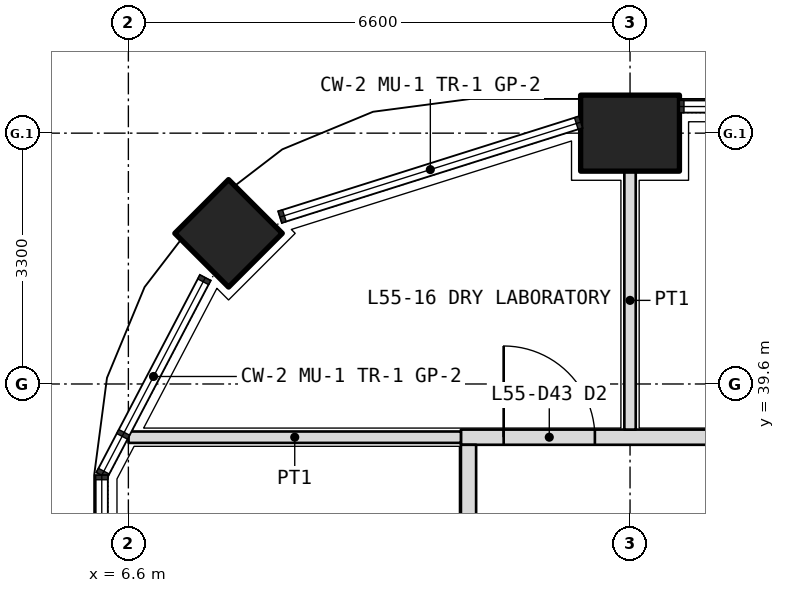
"""IFC4 building model, lengths in metres.
Left out: names, types, materials, properties, quantities, classifications, styles, units other than length and angle.
Written with IfcOpenShell. Run it as: python <this file> out.ifc"""

import sys

from ifc_helpers import new_model, si_unit, direction, frame, frame_2d, origin, origin_2d, place, context, subcontext, project, spatial, rectangle, extrude, element, fill, save


model = new_model("IFC4")
c1 = context("Model", 3, precision=1e-05, world=origin(), true_north=direction((0.0, 1.0)))
c2 = subcontext(c1, "Body", "Model", "MODEL_VIEW")
j1 = project(units=[si_unit("LENGTHUNIT", "METRE"), si_unit("PLANEANGLEUNIT", "RADIAN")], contexts=[c1])
p1 = place(None, origin())
s1 = spatial("IfcSite", under=j1, at=p1, CompositionType="ELEMENT")
p2 = place(p1, origin())
s2 = spatial("IfcBuilding", under=s1, at=p2, CompositionType="ELEMENT")
p3 = place(p2, frame((0.0, 0.0, 241.8)))
s3 = spatial("IfcBuildingStorey", under=s2, at=p3, CompositionType="ELEMENT", Elevation=241.8)
p4 = place(p3, frame((7.918, 41.582, 0.0), z_axis=(0.0, 0.0, 1.0), x_axis=(0.707106781187, 0.707106781187, 0.0)))
e1 = element("IfcColumn", 1, at=p4, inside=s3, PredefinedType="COLUMN", context=c2, shape_type="SweptSolid", body=[
    extrude(rectangle(XDim=1.0, YDim=1.0, at=origin_2d()), origin(), (0.0, 0.0, 1.0), 4.2),
])
p5 = place(p3, frame((13.2, 42.9, 0.0), z_axis=(0.0, 0.0, 1.0), x_axis=(1.0, 0.0, 0.0)))
e2 = element("IfcColumn", 2, at=p5, inside=s3, PredefinedType="COLUMN", context=c2, shape_type="SweptSolid", body=[
    extrude(rectangle(XDim=1.3, YDim=1.0, at=origin_2d()), origin(), (0.0, 0.0, 1.0), 4.2),
])
p6 = place(p3, frame((10.975, 38.9, 0.0), z_axis=(0.0, 0.0, 1.0), x_axis=(1.0, 0.0, 0.0)))
e3 = element("IfcWall", 3, at=p6, inside=s3, PredefinedType="PARTITIONING", context=c2, shape_type="SweptSolid", body=[
    extrude(rectangle(XDim=22.025, YDim=0.2, at=frame_2d((11.012, 0.0))), origin(), (0.0, 0.0, 1.0), 3.0),
])
p7 = place(p6, frame((0.562, 0.0, 0.0)))
e4 = element("IfcOpeningElement", 4, at=p7, cuts=e3, PredefinedType="OPENING", context=c2, shape_type="SweptSolid", body=[
    extrude(rectangle(XDim=1.2, YDim=2.1, at=frame_2d((0.6, 1.05))), frame((0.0, 0.11, 0.0), z_axis=(0.0, -1.0, 0.0), x_axis=(1.0, 0.0, 0.0)), (0.0, 0.0, 1.0), 0.22),
])
p8 = place(p6, frame((6.675, 0.0, 0.0)))
e5 = element("IfcOpeningElement", 5, at=p8, cuts=e3, PredefinedType="OPENING", context=c2, shape_type="SweptSolid", body=[
    extrude(rectangle(XDim=1.0, YDim=2.1, at=frame_2d((0.5, 1.05))), frame((0.0, 0.11, 0.0), z_axis=(0.0, -1.0, 0.0), x_axis=(1.0, 0.0, 0.0)), (0.0, 0.0, 1.0), 0.22),
])
p9 = place(p6, frame((13.375, 0.0, 0.0)))
e6 = element("IfcOpeningElement", 6, at=p9, cuts=e3, PredefinedType="OPENING", context=c2, shape_type="SweptSolid", body=[
    extrude(rectangle(XDim=1.0, YDim=2.1, at=frame_2d((0.5, 1.05))), frame((0.0, 0.11, 0.0), z_axis=(0.0, -1.0, 0.0), x_axis=(1.0, 0.0, 0.0)), (0.0, 0.0, 1.0), 0.22),
])
p10 = place(p6, frame((16.675, 0.0, 0.0)))
e7 = element("IfcOpeningElement", 7, at=p10, cuts=e3, PredefinedType="OPENING", context=c2, shape_type="SweptSolid", body=[
    extrude(rectangle(XDim=1.0, YDim=2.1, at=frame_2d((0.5, 1.05))), frame((0.0, 0.11, 0.0), z_axis=(0.0, -1.0, 0.0), x_axis=(1.0, 0.0, 0.0)), (0.0, 0.0, 1.0), 0.22),
])
p11 = place(p6, frame((19.875, 0.0, 0.0)))
e8 = element("IfcOpeningElement", 8, at=p11, cuts=e3, PredefinedType="OPENING", context=c2, shape_type="SweptSolid", body=[
    extrude(rectangle(XDim=1.0, YDim=2.1, at=frame_2d((0.5, 1.05))), frame((0.0, 0.11, 0.0), z_axis=(0.0, -1.0, 0.0), x_axis=(1.0, 0.0, 0.0)), (0.0, 0.0, 1.0), 0.22),
])
p12 = place(p3, frame((11.075, 7.4, 0.0), z_axis=(0.0, 0.0, 1.0), x_axis=(0.0, 1.0, 0.0)))
e9 = element("IfcWall", 9, at=p12, inside=s3, PredefinedType="PARTITIONING", context=c2, shape_type="SweptSolid", body=[
    extrude(rectangle(XDim=31.4, YDim=0.2, at=frame_2d((15.7, 0.0))), origin(), (0.0, 0.0, 1.0), 3.0),
])
p13 = place(p12, frame((2.35, 0.0, 0.0)))
e10 = element("IfcOpeningElement", 10, at=p13, cuts=e9, PredefinedType="OPENING", context=c2, shape_type="SweptSolid", body=[
    extrude(rectangle(XDim=1.0, YDim=2.1, at=frame_2d((0.5, 1.05))), frame((0.0, 0.11, 0.0), z_axis=(0.0, -1.0, 0.0), x_axis=(1.0, 0.0, 0.0)), (0.0, 0.0, 1.0), 0.22),
])
p14 = place(p12, frame((6.35, 0.0, 0.0)))
e11 = element("IfcOpeningElement", 11, at=p14, cuts=e9, PredefinedType="OPENING", context=c2, shape_type="SweptSolid", body=[
    extrude(rectangle(XDim=1.0, YDim=2.1, at=frame_2d((0.5, 1.05))), frame((0.0, 0.11, 0.0), z_axis=(0.0, -1.0, 0.0), x_axis=(1.0, 0.0, 0.0)), (0.0, 0.0, 1.0), 0.22),
])
p15 = place(p12, frame((9.45, 0.0, 0.0)))
e12 = element("IfcOpeningElement", 12, at=p15, cuts=e9, PredefinedType="OPENING", context=c2, shape_type="SweptSolid", body=[
    extrude(rectangle(XDim=0.9, YDim=2.1, at=frame_2d((0.45, 1.05))), frame((0.0, 0.11, 0.0), z_axis=(0.0, -1.0, 0.0), x_axis=(1.0, 0.0, 0.0)), (0.0, 0.0, 1.0), 0.22),
])
p16 = place(p12, frame((13.35, 0.0, 0.0)))
e13 = element("IfcOpeningElement", 13, at=p16, cuts=e9, PredefinedType="OPENING", context=c2, shape_type="SweptSolid", body=[
    extrude(rectangle(XDim=0.9, YDim=2.1, at=frame_2d((0.45, 1.05))), frame((0.0, 0.11, 0.0), z_axis=(0.0, -1.0, 0.0), x_axis=(1.0, 0.0, 0.0)), (0.0, 0.0, 1.0), 0.22),
])
p17 = place(p12, frame((20.15, 0.0, 0.0)))
e14 = element("IfcOpeningElement", 14, at=p17, cuts=e9, PredefinedType="OPENING", context=c2, shape_type="SweptSolid", body=[
    extrude(rectangle(XDim=1.0, YDim=2.1, at=frame_2d((0.5, 1.05))), frame((0.0, 0.11, 0.0), z_axis=(0.0, -1.0, 0.0), x_axis=(1.0, 0.0, 0.0)), (0.0, 0.0, 1.0), 0.22),
])
p18 = place(p12, frame((28.05, 0.0, 0.0)))
e15 = element("IfcOpeningElement", 15, at=p18, cuts=e9, PredefinedType="OPENING", context=c2, shape_type="SweptSolid", body=[
    extrude(rectangle(XDim=1.0, YDim=2.1, at=frame_2d((0.5, 1.05))), frame((0.0, 0.11, 0.0), z_axis=(0.0, -1.0, 0.0), x_axis=(1.0, 0.0, 0.0)), (0.0, 0.0, 1.0), 0.22),
])
p19 = place(p3, frame((6.603, 38.9, 0.0), z_axis=(0.0, 0.0, 1.0), x_axis=(1.0, 0.0, 0.0)))
e16 = element("IfcWall", 16, at=p19, inside=s3, PredefinedType="PARTITIONING", context=c2, shape_type="SweptSolid", body=[
    extrude(rectangle(XDim=4.373, YDim=0.15, at=frame_2d((2.186, 0.0))), origin(), (0.0, 0.0, 1.0), 2.7),
])
p20 = place(p3, frame((13.2, 42.4, 0.0), z_axis=(0.0, 0.0, 1.0), x_axis=(0.0, -1.0, 0.0)))
e17 = element("IfcWall", 17, at=p20, inside=s3, PredefinedType="PARTITIONING", context=c2, shape_type="SweptSolid", body=[
    extrude(rectangle(XDim=3.4, YDim=0.15, at=frame_2d((1.7, 0.0))), origin(), (0.0, 0.0, 1.0), 3.0),
])
p21 = place(p7, origin())
e18 = element("IfcDoor", 18, at=p21, inside=s3, OperationType="DOUBLE_DOOR_SINGLE_SWING", PredefinedType="DOOR", context=c2, shape_type="SweptSolid", body=[
    extrude(rectangle(XDim=1.2, YDim=2.1, at=frame_2d((0.6, 1.05))), frame((0.0, 0.025, 0.0), z_axis=(0.0, -1.0, 0.0), x_axis=(1.0, 0.0, 0.0)), (0.0, 0.0, 1.0), 0.05),
])
fill(e4, e18)
save(model, sys.argv[1])
